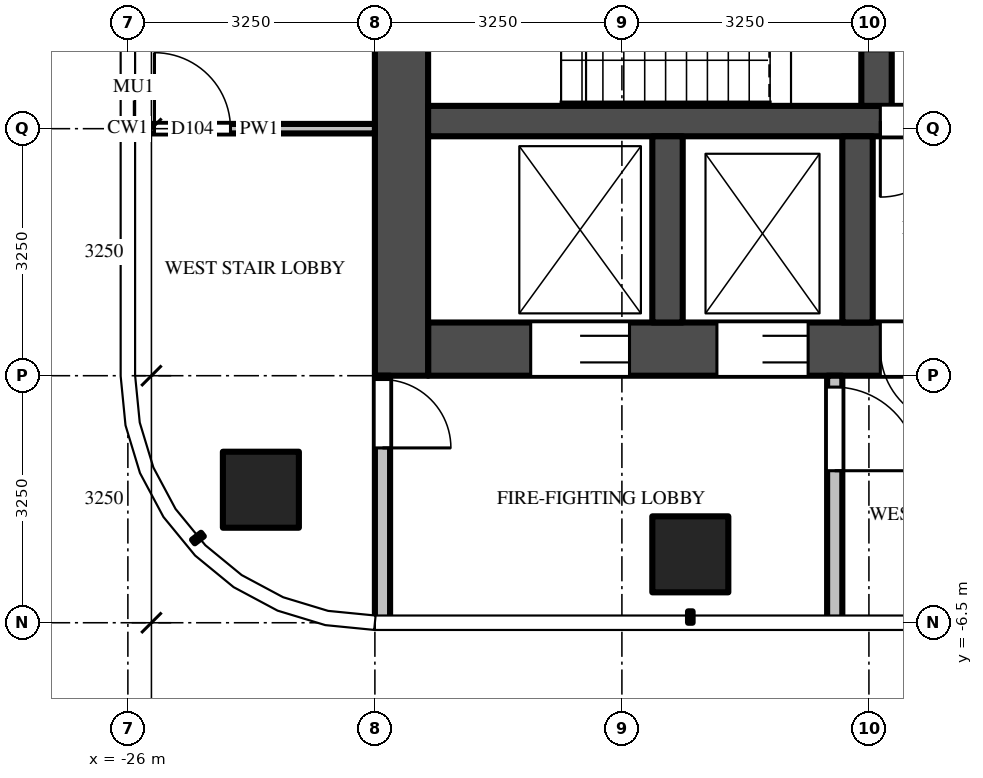
"""IFC4 building model, lengths in metres.
Left out: names, types, materials, properties, quantities, classifications, styles, units other than length and angle.
Written with IfcOpenShell. Run it as: python <this file> out.ifc"""

import sys

from ifc_helpers import new_model, si_unit, direction, frame, frame_2d, origin, origin_2d, place, context, subcontext, project, spatial, rectangle, extrude, source, transform, mapped, element, fill, save


model = new_model("IFC4")
c1 = context("Model", 3, precision=1e-05, world=origin(), true_north=direction((0.0, 1.0)))
c2 = subcontext(c1, "Body", "Model", "MODEL_VIEW")
j1 = project(units=[si_unit("LENGTHUNIT", "METRE"), si_unit("PLANEANGLEUNIT", "RADIAN")], contexts=[c1])
p1 = place(None, origin())
s1 = spatial("IfcSite", under=j1, at=p1, CompositionType="ELEMENT")
p2 = place(p1, origin())
s2 = spatial("IfcBuilding", under=s1, at=p2, CompositionType="ELEMENT")
p3 = place(p2, frame((0.0, 0.0, 283.3)))
s3 = spatial("IfcBuildingStorey", under=s2, at=p3, CompositionType="ELEMENT", Elevation=283.3)
m1 = source(origin(), c2, "Body", "SweptSolid", [
    extrude(rectangle(XDim=1.0, YDim=1.0, at=origin_2d()), origin(), (0.0, 0.0, 1.0), 3.9),
])
for number, where, z_axis, x_axis in (
    (1, (-18.6, -5.6, 0.0), (0.0, 0.0, 1.0), (1.0, 0.0, 0.0)),
    (2, (-24.25, -4.75, 0.0), (0.0, 0.0, 1.0), (1.0, 0.0, 0.0)),
):
    element("IfcColumn", number, at=place(p3, frame(where, z_axis=z_axis, x_axis=x_axis)), inside=s3, PredefinedType="COLUMN", context=c2, shape_type="MappedRepresentation", body=[
        mapped(m1, transform((0.0, 0.0, 0.0))),
    ])
m2 = source(origin(), c2, "Body", "SweptSolid", [
    extrude(rectangle(XDim=14.85, YDim=0.7, at=frame_2d((7.425, 0.0))), origin(), (0.0, 0.0, 1.0), 3.7),
])
p4 = place(p3, frame((-7.2, -2.9, 0.0), z_axis=(0.0, 0.0, 1.0), x_axis=(-1.0, 0.0, 0.0)))
e3 = element("IfcWall", 3, at=p4, inside=s3, PredefinedType="SHEAR", context=c2, shape_type="MappedRepresentation", body=[
    mapped(m2, transform((0.0, 0.0, 0.0))),
])
m3 = source(origin(), c2, "Body", "SweptSolid", [
    extrude(rectangle(XDim=1.2, YDim=2.1, at=frame_2d((0.6, 1.05))), frame((0.0, 0.36, 0.0), z_axis=(0.0, -1.0, 0.0), x_axis=(1.0, 0.0, 0.0)), (0.0, 0.0, 1.0), 0.72),
])
p5 = place(p4, frame((5.7, 0.0, 0.0)))
e4 = element("IfcOpeningElement", 4, at=p5, cuts=e3, PredefinedType="OPENING", context=c2, shape_type="MappedRepresentation", body=[
    mapped(m3, transform((0.0, 0.0, 0.0))),
])
m4 = source(origin(), c2, "Body", "SweptSolid", [
    extrude(rectangle(XDim=1.3, YDim=2.1, at=frame_2d((0.65, 1.05))), frame((0.0, 0.36, 0.0), z_axis=(0.0, -1.0, 0.0), x_axis=(1.0, 0.0, 0.0)), (0.0, 0.0, 1.0), 0.72),
])
p6 = place(p4, frame((12.2, 0.0, 0.0)))
e5 = element("IfcOpeningElement", 5, at=p6, cuts=e3, PredefinedType="OPENING", context=c2, shape_type="MappedRepresentation", body=[
    mapped(m4, transform((0.0, 0.0, 0.0))),
])
p7 = place(p4, frame((9.85, 0.0, 0.0)))
e6 = element("IfcOpeningElement", 6, at=p7, cuts=e3, PredefinedType="OPENING", context=c2, shape_type="MappedRepresentation", body=[
    mapped(m3, transform((0.0, 0.0, 0.0))),
])
m5 = source(origin(), c2, "Body", "SweptSolid", [
    extrude(rectangle(XDim=1.0, YDim=2.1, at=frame_2d((0.5, 1.05))), frame((0.0, 0.36, 0.0), z_axis=(0.0, -1.0, 0.0), x_axis=(1.0, 0.0, 0.0)), (0.0, 0.0, 1.0), 0.72),
])
p8 = place(p4, frame((7.9, 0.0, 0.0)))
e7 = element("IfcOpeningElement", 7, at=p8, cuts=e3, PredefinedType="OPENING", context=c2, shape_type="MappedRepresentation", body=[
    mapped(m5, transform((0.0, 0.0, 0.0))),
])
m6 = source(origin(), c2, "Body", "SweptSolid", [
    extrude(rectangle(XDim=0.8, YDim=2.1, at=frame_2d((0.4, 1.05))), frame((0.0, 0.36, 0.0), z_axis=(0.0, -1.0, 0.0), x_axis=(1.0, 0.0, 0.0)), (0.0, 0.0, 1.0), 0.72),
])
p9 = place(p4, frame((0.212, 0.0, 0.0)))
e8 = element("IfcOpeningElement", 8, at=p9, cuts=e3, PredefinedType="OPENING", context=c2, shape_type="MappedRepresentation", body=[
    mapped(m6, transform((0.0, 0.0, 0.0))),
])
p10 = place(p4, frame((2.587, 0.0, 0.0)))
e9 = element("IfcOpeningElement", 9, at=p10, cuts=e3, PredefinedType="OPENING", context=c2, shape_type="MappedRepresentation", body=[
    mapped(m5, transform((0.0, 0.0, 0.0))),
])
m7 = source(origin(), c2, "Body", "SweptSolid", [
    extrude(rectangle(XDim=9.05, YDim=0.7, at=frame_2d((4.525, 0.0))), origin(), (0.0, 0.0, 1.0), 3.7),
])
p11 = place(p3, frame((-22.4, 5.8, 0.0), z_axis=(0.0, 0.0, 1.0), x_axis=(0.0, -1.0, 0.0)))
e10 = element("IfcWall", 10, at=p11, inside=s3, PredefinedType="SHEAR", context=c2, shape_type="MappedRepresentation", body=[
    mapped(m7, transform((0.0, 0.0, 0.0))),
])
m8 = source(origin(), c2, "Body", "SweptSolid", [
    extrude(rectangle(XDim=14.85, YDim=0.4, at=frame_2d((7.425, 0.0))), origin(), (0.0, 0.0, 1.0), 3.7),
])
p12 = place(p3, frame((-7.2, 0.1, 0.0), z_axis=(0.0, 0.0, 1.0), x_axis=(-1.0, 0.0, 0.0)))
e11 = element("IfcWall", 11, at=p12, inside=s3, PredefinedType="SHEAR", context=c2, shape_type="MappedRepresentation", body=[
    mapped(m8, transform((0.0, 0.0, 0.0))),
])
m9 = source(origin(), c2, "Body", "SweptSolid", [
    extrude(rectangle(XDim=1.0, YDim=2.1, at=frame_2d((0.5, 1.05))), frame((0.0, 0.21, 0.0), z_axis=(0.0, -1.0, 0.0), x_axis=(1.0, 0.0, 0.0)), (0.0, 0.0, 1.0), 0.42),
])
p13 = place(p12, frame((7.9, 0.0, 0.0)))
e12 = element("IfcOpeningElement", 12, at=p13, cuts=e11, PredefinedType="OPENING", context=c2, shape_type="MappedRepresentation", body=[
    mapped(m9, transform((0.0, 0.0, 0.0))),
])
m10 = source(origin(), c2, "Body", "SweptSolid", [
    extrude(rectangle(XDim=5.5, YDim=0.4, at=frame_2d((2.75, 0.0))), origin(), (0.0, 0.0, 1.0), 3.7),
])
p14 = place(p3, frame((-16.15, 5.8, 0.0), z_axis=(0.0, 0.0, 1.0), x_axis=(0.0, -1.0, 0.0)))
e13 = element("IfcWall", 13, at=p14, inside=s3, PredefinedType="SHEAR", context=c2, shape_type="MappedRepresentation", body=[
    mapped(m10, transform((0.0, 0.0, 0.0))),
])
m11 = source(origin(), c2, "Body", "SweptSolid", [
    extrude(rectangle(XDim=1.1, YDim=2.1, at=frame_2d((0.55, 1.05))), frame((0.0, 0.21, 0.0), z_axis=(0.0, -1.0, 0.0), x_axis=(1.0, 0.0, 0.0)), (0.0, 0.0, 1.0), 0.42),
])
p15 = place(p14, frame((0.725, 0.0, 0.0)))
e14 = element("IfcOpeningElement", 14, at=p15, cuts=e13, PredefinedType="OPENING", context=c2, shape_type="MappedRepresentation", body=[
    mapped(m11, transform((0.0, 0.0, 0.0))),
])
p16 = place(p14, frame((3.675, 0.0, 0.0)))
e15 = element("IfcOpeningElement", 15, at=p16, cuts=e13, PredefinedType="OPENING", context=c2, shape_type="MappedRepresentation", body=[
    mapped(m11, transform((0.0, 0.0, 0.0))),
])
m12 = source(origin(), c2, "Body", "SweptSolid", [
    extrude(rectangle(XDim=2.45, YDim=0.4, at=frame_2d((1.225, 0.0))), origin(), (0.0, 0.0, 1.0), 3.7),
])
for number, where, z_axis, x_axis in (
    (16, (-16.4, -0.1, 0.0), (0.0, 0.0, 1.0), (0.0, -1.0, 0.0)),
    (17, (-18.9, -0.1, 0.0), (0.0, 0.0, 1.0), (0.0, -1.0, 0.0)),
):
    element("IfcWall", number, at=place(p3, frame(where, z_axis=z_axis, x_axis=x_axis)), inside=s3, PredefinedType="SHEAR", context=c2, shape_type="MappedRepresentation", body=[
        mapped(m12, transform((0.0, 0.0, 0.0))),
    ])
m13 = source(origin(), c2, "Body", "SweptSolid", [
    extrude(rectangle(XDim=3.25, YDim=0.2, at=frame_2d((1.625, 0.0))), origin(), (0.0, 0.0, 1.0), 3.7),
])
p17 = place(p3, frame((-16.7, -3.25, 0.0), z_axis=(0.0, 0.0, 1.0), x_axis=(0.0, -1.0, 0.0)))
e18 = element("IfcWall", 18, at=p17, inside=s3, PredefinedType="PARTITIONING", context=c2, shape_type="MappedRepresentation", body=[
    mapped(m13, transform((0.0, 0.0, 0.0))),
])
m14 = source(origin(), c2, "Body", "SweptSolid", [
    extrude(rectangle(XDim=1.1, YDim=2.1, at=frame_2d((0.55, 1.05))), frame((0.0, 0.11, 0.0), z_axis=(0.0, -1.0, 0.0), x_axis=(1.0, 0.0, 0.0)), (0.0, 0.0, 1.0), 0.22),
])
p18 = place(p17, frame((0.15, 0.0, 0.0)))
e19 = element("IfcOpeningElement", 19, at=p18, cuts=e18, PredefinedType="OPENING", context=c2, shape_type="MappedRepresentation", body=[
    mapped(m14, transform((0.0, 0.0, 0.0))),
])
p19 = place(p3, frame((-22.65, -3.25, 0.0), z_axis=(0.0, 0.0, 1.0), x_axis=(0.0, -1.0, 0.0)))
e20 = element("IfcWall", 20, at=p19, inside=s3, PredefinedType="PARTITIONING", context=c2, shape_type="MappedRepresentation", body=[
    mapped(m13, transform((0.0, 0.0, 0.0))),
])
m15 = source(origin(), c2, "Body", "SweptSolid", [
    extrude(rectangle(XDim=0.9, YDim=2.1, at=frame_2d((0.45, 1.05))), frame((0.0, 0.11, 0.0), z_axis=(0.0, -1.0, 0.0), x_axis=(1.0, 0.0, 0.0)), (0.0, 0.0, 1.0), 0.22),
])
p20 = place(p19, frame((0.05, 0.0, 0.0)))
e21 = element("IfcOpeningElement", 21, at=p20, cuts=e20, PredefinedType="OPENING", context=c2, shape_type="MappedRepresentation", body=[
    mapped(m15, transform((0.0, 0.0, 0.0))),
])
m16 = source(origin(), c2, "Body", "SweptSolid", [
    extrude(rectangle(XDim=3.05, YDim=0.125, at=frame_2d((1.525, 0.0))), origin(), (0.0, 0.0, 1.0), 2.78),
])
p21 = place(p3, frame((-25.8, 0.0, 0.0), z_axis=(0.0, 0.0, 1.0), x_axis=(1.0, 0.0, 0.0)))
e22 = element("IfcWall", 22, at=p21, inside=s3, PredefinedType="PARTITIONING", context=c2, shape_type="MappedRepresentation", body=[
    mapped(m16, transform((0.0, 0.0, 0.0))),
])
m17 = source(origin(), c2, "Body", "SweptSolid", [
    extrude(rectangle(XDim=1.0, YDim=2.1, at=frame_2d((0.5, 1.05))), frame((0.0, 0.073, 0.0), z_axis=(0.0, -1.0, 0.0), x_axis=(1.0, 0.0, 0.0)), (0.0, 0.0, 1.0), 0.145),
])
p22 = place(p21, frame((0.15, 0.0, 0.0)))
e23 = element("IfcOpeningElement", 23, at=p22, cuts=e22, PredefinedType="OPENING", context=c2, shape_type="MappedRepresentation", body=[
    mapped(m17, transform((0.0, 0.0, 0.0))),
])
m18 = source(origin(), c2, "Body", "SweptSolid", [
    extrude(rectangle(XDim=1.3, YDim=2.1, at=frame_2d((0.65, 1.05))), frame((0.0, -0.275, 0.0), z_axis=(0.0, -1.0, 0.0), x_axis=(1.0, 0.0, 0.0)), (0.0, 0.0, 1.0), 0.05),
])
p23 = place(p6, origin())
e24 = element("IfcDoor", 24, at=p23, inside=s3, OperationType="DOUBLE_DOOR_SLIDING", PredefinedType="DOOR", context=c2, shape_type="MappedRepresentation", body=[
    mapped(m18, transform((0.0, 0.0, 0.0))),
])
fill(e5, e24)
m19 = source(origin(), c2, "Body", "SweptSolid", [
    extrude(rectangle(XDim=1.2, YDim=2.1, at=frame_2d((0.6, 1.05))), frame((0.0, -0.275, 0.0), z_axis=(0.0, -1.0, 0.0), x_axis=(1.0, 0.0, 0.0)), (0.0, 0.0, 1.0), 0.05),
])
p24 = place(p7, origin())
e25 = element("IfcDoor", 25, at=p24, inside=s3, OperationType="DOUBLE_DOOR_SLIDING", PredefinedType="DOOR", context=c2, shape_type="MappedRepresentation", body=[
    mapped(m19, transform((0.0, 0.0, 0.0))),
])
fill(e6, e25)
m20 = source(origin(), c2, "Body", "SweptSolid", [
    extrude(rectangle(XDim=1.0, YDim=2.1, at=frame_2d((0.5, 1.05))), frame((0.0, 0.025, 0.0), z_axis=(0.0, -1.0, 0.0), x_axis=(1.0, 0.0, 0.0)), (0.0, 0.0, 1.0), 0.05),
])
p25 = place(p13, origin())
e26 = element("IfcDoor", 26, at=p25, inside=s3, OperationType="SINGLE_SWING_RIGHT", PredefinedType="DOOR", context=c2, shape_type="MappedRepresentation", body=[
    mapped(m20, transform((0.0, 0.0, 0.0))),
])
fill(e12, e26)
m21 = source(origin(), c2, "Body", "SweptSolid", [
    extrude(rectangle(XDim=1.0, YDim=2.1, at=frame_2d((0.5, 1.05))), frame((0.0, -0.275, 0.0), z_axis=(0.0, -1.0, 0.0), x_axis=(1.0, 0.0, 0.0)), (0.0, 0.0, 1.0), 0.05),
])
p26 = place(p8, origin())
e27 = element("IfcDoor", 27, at=p26, inside=s3, OperationType="SINGLE_SWING_LEFT", PredefinedType="DOOR", context=c2, shape_type="MappedRepresentation", body=[
    mapped(m21, transform((0.0, 0.0, 0.0))),
])
fill(e7, e27)
m22 = source(origin(), c2, "Body", "SweptSolid", [
    extrude(rectangle(XDim=1.1, YDim=2.1, at=frame_2d((0.55, 1.05))), frame((0.0, 0.025, 0.0), z_axis=(0.0, -1.0, 0.0), x_axis=(1.0, 0.0, 0.0)), (0.0, 0.0, 1.0), 0.05),
])
p27 = place(p18, origin())
e28 = element("IfcDoor", 28, at=p27, inside=s3, OperationType="SINGLE_SWING_RIGHT", PredefinedType="DOOR", context=c2, shape_type="MappedRepresentation", body=[
    mapped(m22, transform((0.0, 0.0, 0.0))),
])
fill(e19, e28)
m23 = source(origin(), c2, "Body", "SweptSolid", [
    extrude(rectangle(XDim=0.9, YDim=2.1, at=frame_2d((0.45, 1.05))), frame((0.0, 0.025, 0.0), z_axis=(0.0, -1.0, 0.0), x_axis=(1.0, 0.0, 0.0)), (0.0, 0.0, 1.0), 0.05),
])
p28 = place(p20, origin())
e29 = element("IfcDoor", 29, at=p28, inside=s3, OperationType="SINGLE_SWING_RIGHT", PredefinedType="DOOR", context=c2, shape_type="MappedRepresentation", body=[
    mapped(m23, transform((0.0, 0.0, 0.0))),
])
fill(e21, e29)
p29 = place(p22, origin())
e30 = element("IfcDoor", 30, at=p29, inside=s3, OperationType="SINGLE_SWING_LEFT", PredefinedType="DOOR", context=c2, shape_type="MappedRepresentation", body=[
    mapped(m20, transform((0.0, 0.0, 0.0))),
])
fill(e23, e30)
save(model, sys.argv[1])
